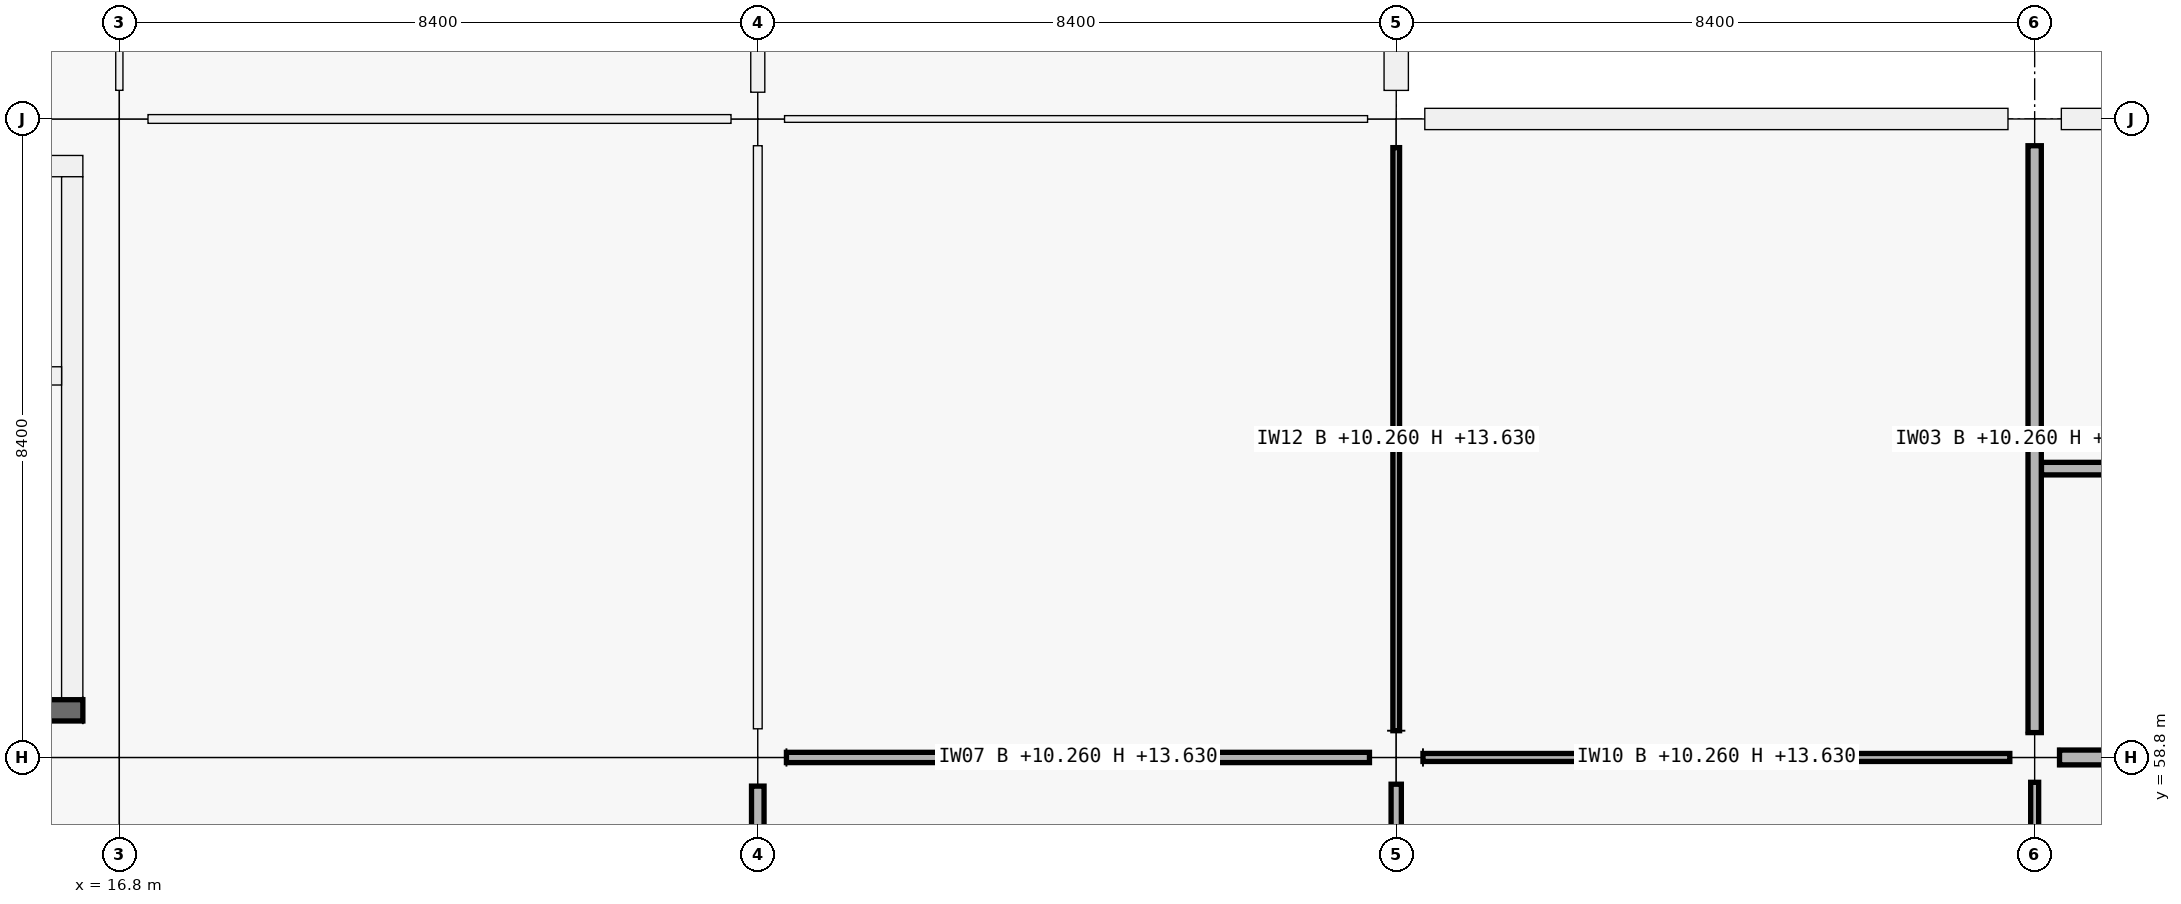
"""IFC4 building model, lengths in metres.
Left out: names, types, materials, properties, quantities, classifications, styles, units other than length and angle.
Written with IfcOpenShell. Run it as: python <this file> out.ifc"""

import sys

from ifc_helpers import new_model, si_unit, direction, frame, frame_2d, origin, origin_2d, place, context, subcontext, project, spatial, rectangle, extrude, element, fill, save


model = new_model("IFC4")
c1 = context("Model", 3, precision=1e-05, world=origin(), true_north=direction((0.0, 1.0)))
c2 = subcontext(c1, "Body", "Model", "MODEL_VIEW")
j1 = project(units=[si_unit("LENGTHUNIT", "METRE"), si_unit("PLANEANGLEUNIT", "RADIAN")], contexts=[c1])
p1 = place(None, origin())
s1 = spatial("IfcSite", under=j1, at=p1, CompositionType="ELEMENT")
p2 = place(p1, origin())
s2 = spatial("IfcBuilding", under=s1, at=p2, CompositionType="ELEMENT")
p3 = place(p2, frame((0.0, 0.0, 10.26)))
s3 = spatial("IfcBuildingStorey", under=s2, at=p3, CompositionType="ELEMENT", Elevation=10.26)
p4 = place(p3, frame((16.8, 58.8, 0.0), z_axis=(0.0, 0.0, 1.0), x_axis=(1.0, 0.0, 0.0)))
e1 = element("IfcColumn", 1, at=p4, inside=s3, PredefinedType="COLUMN", context=c2, shape_type="SweptSolid", body=[
    extrude(rectangle(XDim=0.7, YDim=0.7, at=origin_2d()), origin(), (0.0, 0.0, 1.0), 4.5),
])
for number, where, z_axis, x_axis in (
    (2, (16.8, 67.2, 0.0), (0.0, 0.0, 1.0), (1.0, 0.0, 0.0)),
    (3, (25.2, 58.8, 0.0), (0.0, 0.0, 1.0), (1.0, 0.0, 0.0)),
):
    element("IfcColumn", number, at=place(p3, frame(where, z_axis=z_axis, x_axis=x_axis)), inside=s3, PredefinedType="COLUMN", context=c2, shape_type="SweptSolid", body=[
        extrude(rectangle(XDim=0.75, YDim=0.75, at=origin_2d()), origin(), (0.0, 0.0, 1.0), 4.5),
    ])
for number, where, z_axis, x_axis in (
    (4, (25.2, 67.2, 0.0), (0.0, 0.0, 1.0), (1.0, 0.0, 0.0)),
    (5, (33.6, 58.8, 0.0), (0.0, 0.0, 1.0), (1.0, 0.0, 0.0)),
):
    element("IfcColumn", number, at=place(p3, frame(where, z_axis=z_axis, x_axis=x_axis)), inside=s3, PredefinedType="COLUMN", context=c2, shape_type="SweptSolid", body=[
        extrude(rectangle(XDim=0.7, YDim=0.7, at=origin_2d()), origin(), (0.0, 0.0, 1.0), 4.5),
    ])
p5 = place(p3, frame((33.6, 67.2, 0.0), z_axis=(0.0, 0.0, 1.0), x_axis=(1.0, 0.0, 0.0)))
e6 = element("IfcColumn", 6, at=p5, inside=s3, PredefinedType="COLUMN", context=c2, shape_type="SweptSolid", body=[
    extrude(rectangle(XDim=0.75, YDim=0.75, at=origin_2d()), origin(), (0.0, 0.0, 1.0), 4.5),
])
p6 = place(p3, frame((42.0, 58.8, 0.0), z_axis=(0.0, 0.0, 1.0), x_axis=(1.0, 0.0, 0.0)))
e7 = element("IfcColumn", 7, at=p6, inside=s3, PredefinedType="COLUMN", context=c2, shape_type="SweptSolid", body=[
    extrude(rectangle(XDim=0.65, YDim=0.65, at=origin_2d()), origin(), (0.0, 0.0, 1.0), 4.5),
])
p7 = place(p3, frame((42.0, 67.2, 0.0), z_axis=(0.0, 0.0, 1.0), x_axis=(1.0, 0.0, 0.0)))
e8 = element("IfcColumn", 8, at=p7, inside=s3, PredefinedType="COLUMN", context=c2, shape_type="SweptSolid", body=[
    extrude(rectangle(XDim=0.7, YDim=0.7, at=origin_2d()), origin(), (0.0, 0.0, 1.0), 4.5),
])
p8 = place(p3, frame((33.6, 75.249, 0.0), z_axis=(0.0, 0.0, 1.0), x_axis=(0.0, -1.0, 0.0)))
e9 = element("IfcWall", 9, at=p8, inside=s3, PredefinedType="SOLIDWALL", context=c2, shape_type="SweptSolid", body=[
    extrude(rectangle(XDim=7.673, YDim=0.32, at=frame_2d((3.836, 0.0))), origin(), (0.0, 0.0, 1.0), 3.54),
])
p9 = place(p8, frame((2.486, 0.0, 0.9)))
e10 = element("IfcOpeningElement", 10, at=p9, cuts=e9, PredefinedType="OPENING", context=c2, shape_type="SweptSolid", body=[
    extrude(rectangle(XDim=2.7, YDim=1.2, at=frame_2d((1.35, 0.6))), frame((0.0, 0.16, 0.0), z_axis=(0.0, -1.0, 0.0), x_axis=(1.0, 0.0, 0.0)), (0.0, 0.0, 1.0), 0.32),
])
p10 = place(p3, frame((33.976, 67.2, 0.0), z_axis=(0.0, 0.0, 1.0), x_axis=(1.0, 0.0, 0.0)))
e11 = element("IfcWall", 11, at=p10, inside=s3, PredefinedType="SOLIDWALL", context=c2, shape_type="SweptSolid", body=[
    extrude(rectangle(XDim=7.673, YDim=0.28, at=frame_2d((3.836, 0.0))), origin(), (0.0, 0.0, 1.0), 3.54),
])
p11 = place(p10, frame((2.937, 0.0, 0.9)))
e12 = element("IfcOpeningElement", 12, at=p11, cuts=e11, PredefinedType="OPENING", context=c2, shape_type="SweptSolid", body=[
    extrude(rectangle(XDim=1.8, YDim=1.35, at=frame_2d((0.9, 0.675))), frame((0.0, 0.14, 0.0), z_axis=(0.0, -1.0, 0.0), x_axis=(1.0, 0.0, 0.0)), (0.0, 0.0, 1.0), 0.28),
])
p12 = place(p3, frame((42.351, 67.2, 0.0), z_axis=(0.0, 0.0, 1.0), x_axis=(1.0, 0.0, 0.0)))
e13 = element("IfcWall", 13, at=p12, inside=s3, PredefinedType="SOLIDWALL", context=c2, shape_type="SweptSolid", body=[
    extrude(rectangle(XDim=7.673, YDim=0.28, at=frame_2d((3.836, 0.0))), origin(), (0.0, 0.0, 1.0), 3.54),
])
p13 = place(p12, frame((3.136, 0.0, 0.9)))
e14 = element("IfcOpeningElement", 14, at=p13, cuts=e13, PredefinedType="OPENING", context=c2, shape_type="SweptSolid", body=[
    extrude(rectangle(XDim=1.4, YDim=1.75, at=frame_2d((0.7, 0.875))), frame((0.0, 0.14, 0.0), z_axis=(0.0, -1.0, 0.0), x_axis=(1.0, 0.0, 0.0)), (0.0, 0.0, 1.0), 0.28),
])
p14 = place(p3, frame((16.32, 59.42, 0.0), z_axis=(0.0, 0.0, 1.0), x_axis=(-1.0, 0.0, 0.0)))
e15 = element("IfcWall", 15, at=p14, inside=s3, PredefinedType="SHEAR", context=c2, shape_type="SweptSolid", body=[
    extrude(rectangle(XDim=7.44, YDim=0.28, at=frame_2d((3.72, 0.0))), origin(), (0.0, 0.0, 1.0), 4.5),
])
p15 = place(p14, frame((1.28, 0.0, 0.0)))
e16 = element("IfcOpeningElement", 16, at=p15, cuts=e15, PredefinedType="OPENING", context=c2, shape_type="SweptSolid", body=[
    extrude(rectangle(XDim=1.5, YDim=2.15, at=frame_2d((0.75, 1.075))), frame((0.0, 0.14, 0.0), z_axis=(0.0, -1.0, 0.0), x_axis=(1.0, 0.0, 0.0)), (0.0, 0.0, 1.0), 0.28),
])
p16 = place(p3, frame((8.88, 66.58, 0.0), z_axis=(0.0, 0.0, 1.0), x_axis=(1.0, 0.0, 0.0)))
e17 = element("IfcWall", 17, at=p16, inside=s3, PredefinedType="SHEAR", context=c2, shape_type="SweptSolid", body=[
    extrude(rectangle(XDim=7.44, YDim=0.28, at=frame_2d((3.72, 0.0))), origin(), (0.0, 0.0, 1.0), 4.5),
])
p17 = place(p3, frame((16.18, 66.44, 0.0), z_axis=(0.0, 0.0, 1.0), x_axis=(0.0, -1.0, 0.0)))
e18 = element("IfcWall", 18, at=p17, inside=s3, PredefinedType="SHEAR", context=c2, shape_type="SweptSolid", body=[
    extrude(rectangle(XDim=6.88, YDim=0.28, at=frame_2d((3.44, 0.0))), origin(), (0.0, 0.0, 1.0), 4.5),
])
p18 = place(p3, frame((12.56, 63.82, 0.0), z_axis=(0.0, 0.0, 1.0), x_axis=(1.0, 0.0, 0.0)))
e19 = element("IfcWall", 19, at=p18, inside=s3, PredefinedType="SHEAR", context=c2, shape_type="SweptSolid", body=[
    extrude(rectangle(XDim=3.48, YDim=0.24, at=frame_2d((1.74, 0.0))), origin(), (0.0, 0.0, 1.0), 4.5),
])
p19 = place(p18, frame((1.19, 0.0, 0.0)))
e20 = element("IfcOpeningElement", 20, at=p19, cuts=e19, PredefinedType="OPENING", context=c2, shape_type="SweptSolid", body=[
    extrude(rectangle(XDim=1.1, YDim=2.15, at=frame_2d((0.55, 1.075))), frame((0.0, 0.12, 0.0), z_axis=(0.0, -1.0, 0.0), x_axis=(1.0, 0.0, 0.0)), (0.0, 0.0, 1.0), 0.24),
])
p20 = place(p3, frame((17.177, 67.2, 0.0), z_axis=(0.0, 0.0, 1.0), x_axis=(1.0, 0.0, 0.0)))
e21 = element("IfcWall", 21, at=p20, inside=s3, PredefinedType="PARTITIONING", context=c2, shape_type="SweptSolid", body=[
    extrude(rectangle(XDim=7.671, YDim=0.115, at=frame_2d((3.835, 0.0))), origin(), (0.0, 0.0, 1.0), 3.37),
])
p21 = place(p20, frame((3.316, 0.0, 0.0)))
e22 = element("IfcOpeningElement", 22, at=p21, cuts=e21, PredefinedType="OPENING", context=c2, shape_type="SweptSolid", body=[
    extrude(rectangle(XDim=1.04, YDim=2.2, at=frame_2d((0.52, 1.1))), frame((0.0, 0.058, 0.0), z_axis=(0.0, -1.0, 0.0), x_axis=(1.0, 0.0, 0.0)), (0.0, 0.0, 1.0), 0.115),
])
p22 = place(p3, frame((25.577, 58.8, 0.0), z_axis=(0.0, 0.0, 1.0), x_axis=(1.0, 0.0, 0.0)))
e23 = element("IfcWall", 23, at=p22, inside=s3, PredefinedType="PARTITIONING", context=c2, shape_type="SweptSolid", body=[
    extrude(rectangle(XDim=7.671, YDim=0.135, at=frame_2d((3.835, 0.0))), origin(), (0.0, 0.0, 1.0), 3.37),
])
p23 = place(p22, frame((3.306, 0.0, 0.0)))
e24 = element("IfcOpeningElement", 24, at=p23, cuts=e23, PredefinedType="OPENING", context=c2, shape_type="SweptSolid", body=[
    extrude(rectangle(XDim=1.06, YDim=2.25, at=frame_2d((0.53, 1.125))), frame((0.0, 0.067, 0.0), z_axis=(0.0, -1.0, 0.0), x_axis=(1.0, 0.0, 0.0)), (0.0, 0.0, 1.0), 0.135),
])
p24 = place(p3, frame((25.552, 67.2, 0.0), z_axis=(0.0, 0.0, 1.0), x_axis=(1.0, 0.0, 0.0)))
e25 = element("IfcWall", 25, at=p24, inside=s3, PredefinedType="PARTITIONING", context=c2, shape_type="SweptSolid", body=[
    extrude(rectangle(XDim=7.671, YDim=0.088, at=frame_2d((3.835, 0.0))), origin(), (0.0, 0.0, 1.0), 3.37),
])
p25 = place(p24, frame((3.316, 0.0, 0.0)))
e26 = element("IfcOpeningElement", 26, at=p25, cuts=e25, PredefinedType="OPENING", context=c2, shape_type="SweptSolid", body=[
    extrude(rectangle(XDim=1.04, YDim=2.2, at=frame_2d((0.52, 1.1))), frame((0.0, 0.044, 0.0), z_axis=(0.0, -1.0, 0.0), x_axis=(1.0, 0.0, 0.0)), (0.0, 0.0, 1.0), 0.088),
])
p26 = place(p3, frame((33.952, 58.8, 0.0), z_axis=(0.0, 0.0, 1.0), x_axis=(1.0, 0.0, 0.0)))
e27 = element("IfcWall", 27, at=p26, inside=s3, PredefinedType="PARTITIONING", context=c2, shape_type="SweptSolid", body=[
    extrude(rectangle(XDim=7.721, YDim=0.105, at=frame_2d((3.861, 0.0))), origin(), (0.0, 0.0, 1.0), 3.37),
])
p27 = place(p26, frame((3.351, 0.0, 0.0)))
e28 = element("IfcOpeningElement", 28, at=p27, cuts=e27, PredefinedType="OPENING", context=c2, shape_type="SweptSolid", body=[
    extrude(rectangle(XDim=1.02, YDim=2.2, at=frame_2d((0.51, 1.1))), frame((0.0, 0.052, 0.0), z_axis=(0.0, -1.0, 0.0), x_axis=(1.0, 0.0, 0.0)), (0.0, 0.0, 1.0), 0.105),
])
p28 = place(p3, frame((42.327, 58.8, 0.0), z_axis=(0.0, 0.0, 1.0), x_axis=(1.0, 0.0, 0.0)))
e29 = element("IfcWall", 29, at=p28, inside=s3, PredefinedType="PARTITIONING", context=c2, shape_type="SweptSolid", body=[
    extrude(rectangle(XDim=7.771, YDim=0.195, at=frame_2d((3.885, 0.0))), origin(), (0.0, 0.0, 1.0), 3.37),
])
p29 = place(p3, frame((16.8, 67.577, 0.0), z_axis=(0.0, 0.0, 1.0), x_axis=(0.0, 1.0, 0.0)))
e30 = element("IfcWall", 30, at=p29, inside=s3, PredefinedType="PARTITIONING", context=c2, shape_type="SweptSolid", body=[
    extrude(rectangle(XDim=7.671, YDim=0.095, at=frame_2d((3.835, 0.0))), origin(), (0.0, 0.0, 1.0), 3.37),
])
p30 = place(p29, frame((3.311, 0.0, 0.0)))
e31 = element("IfcOpeningElement", 31, at=p30, cuts=e30, PredefinedType="OPENING", context=c2, shape_type="SweptSolid", body=[
    extrude(rectangle(XDim=1.05, YDim=2.12, at=frame_2d((0.525, 1.06))), frame((0.0, 0.047, 0.0), z_axis=(0.0, -1.0, 0.0), x_axis=(1.0, 0.0, 0.0)), (0.0, 0.0, 1.0), 0.095),
])
p31 = place(p3, frame((25.2, 50.752, 0.0), z_axis=(0.0, 0.0, 1.0), x_axis=(0.0, 1.0, 0.0)))
e32 = element("IfcWall", 32, at=p31, inside=s3, PredefinedType="PARTITIONING", context=c2, shape_type="SweptSolid", body=[
    extrude(rectangle(XDim=7.671, YDim=0.165, at=frame_2d((3.835, 0.0))), origin(), (0.0, 0.0, 1.0), 3.37),
])
p32 = place(p31, frame((3.306, 0.0, 0.0)))
e33 = element("IfcOpeningElement", 33, at=p32, cuts=e32, PredefinedType="OPENING", context=c2, shape_type="SweptSolid", body=[
    extrude(rectangle(XDim=1.06, YDim=2.25, at=frame_2d((0.53, 1.125))), frame((0.0, 0.083, 0.0), z_axis=(0.0, -1.0, 0.0), x_axis=(1.0, 0.0, 0.0)), (0.0, 0.0, 1.0), 0.165),
])
p33 = place(p3, frame((25.2, 59.177, 0.0), z_axis=(0.0, 0.0, 1.0), x_axis=(0.0, 1.0, 0.0)))
e34 = element("IfcWall", 34, at=p33, inside=s3, PredefinedType="PARTITIONING", context=c2, shape_type="SweptSolid", body=[
    extrude(rectangle(XDim=7.671, YDim=0.115, at=frame_2d((3.835, 0.0))), origin(), (0.0, 0.0, 1.0), 3.37),
])
p34 = place(p33, frame((3.316, 0.0, 0.0)))
e35 = element("IfcOpeningElement", 35, at=p34, cuts=e34, PredefinedType="OPENING", context=c2, shape_type="SweptSolid", body=[
    extrude(rectangle(XDim=1.04, YDim=2.2, at=frame_2d((0.52, 1.1))), frame((0.0, 0.058, 0.0), z_axis=(0.0, -1.0, 0.0), x_axis=(1.0, 0.0, 0.0)), (0.0, 0.0, 1.0), 0.115),
])
p35 = place(p3, frame((25.2, 67.552, 0.0), z_axis=(0.0, 0.0, 1.0), x_axis=(0.0, 1.0, 0.0)))
e36 = element("IfcWall", 36, at=p35, inside=s3, PredefinedType="PARTITIONING", context=c2, shape_type="SweptSolid", body=[
    extrude(rectangle(XDim=7.671, YDim=0.185, at=frame_2d((3.835, 0.0))), origin(), (0.0, 0.0, 1.0), 3.37),
])
p36 = place(p35, frame((3.356, 0.0, 0.0)))
e37 = element("IfcOpeningElement", 37, at=p36, cuts=e36, PredefinedType="OPENING", context=c2, shape_type="SweptSolid", body=[
    extrude(rectangle(XDim=0.96, YDim=2.18, at=frame_2d((0.48, 1.09))), frame((0.0, 0.093, 0.0), z_axis=(0.0, -1.0, 0.0), x_axis=(1.0, 0.0, 0.0)), (0.0, 0.0, 1.0), 0.185),
])
p37 = place(p3, frame((33.6, 50.777, 0.0), z_axis=(0.0, 0.0, 1.0), x_axis=(0.0, 1.0, 0.0)))
e38 = element("IfcWall", 38, at=p37, inside=s3, PredefinedType="PARTITIONING", context=c2, shape_type="SweptSolid", body=[
    extrude(rectangle(XDim=7.671, YDim=0.135, at=frame_2d((3.835, 0.0))), origin(), (0.0, 0.0, 1.0), 3.37),
])
p38 = place(p37, frame((3.336, 0.0, 0.0)))
e39 = element("IfcOpeningElement", 39, at=p38, cuts=e38, PredefinedType="OPENING", context=c2, shape_type="SweptSolid", body=[
    extrude(rectangle(XDim=1.0, YDim=2.2, at=frame_2d((0.5, 1.1))), frame((0.0, 0.067, 0.0), z_axis=(0.0, -1.0, 0.0), x_axis=(1.0, 0.0, 0.0)), (0.0, 0.0, 1.0), 0.135),
])
p39 = place(p3, frame((33.6, 59.152, 0.0), z_axis=(0.0, 0.0, 1.0), x_axis=(0.0, 1.0, 0.0)))
e40 = element("IfcWall", 40, at=p39, inside=s3, PredefinedType="PARTITIONING", context=c2, shape_type="SweptSolid", body=[
    extrude(rectangle(XDim=7.671, YDim=0.088, at=frame_2d((3.835, 0.0))), origin(), (0.0, 0.0, 1.0), 3.37),
])
p40 = place(p39, frame((3.365, 0.0, 0.0)))
e41 = element("IfcOpeningElement", 41, at=p40, cuts=e40, PredefinedType="OPENING", context=c2, shape_type="SweptSolid", body=[
    extrude(rectangle(XDim=0.94, YDim=2.15, at=frame_2d((0.47, 1.075))), frame((0.0, 0.044, 0.0), z_axis=(0.0, -1.0, 0.0), x_axis=(1.0, 0.0, 0.0)), (0.0, 0.0, 1.0), 0.088),
])
p41 = place(p3, frame((42.0, 50.702, 0.0), z_axis=(0.0, 0.0, 1.0), x_axis=(0.0, 1.0, 0.0)))
e42 = element("IfcWall", 42, at=p41, inside=s3, PredefinedType="PARTITIONING", context=c2, shape_type="SweptSolid", body=[
    extrude(rectangle(XDim=7.771, YDim=0.105, at=frame_2d((3.885, 0.0))), origin(), (0.0, 0.0, 1.0), 3.37),
])
p42 = place(p3, frame((42.0, 59.127, 0.0), z_axis=(0.0, 0.0, 1.0), x_axis=(0.0, 1.0, 0.0)))
e43 = element("IfcWall", 43, at=p42, inside=s3, PredefinedType="PARTITIONING", context=c2, shape_type="SweptSolid", body=[
    extrude(rectangle(XDim=7.721, YDim=0.175, at=frame_2d((3.86, 0.0))), origin(), (0.0, 0.0, 1.0), 3.37),
])
p43 = place(p3, frame((42.09, 62.6, 0.0), z_axis=(0.0, 0.0, 1.0), x_axis=(1.0, 0.0, 0.0)))
e44 = element("IfcWall", 44, at=p43, inside=s3, PredefinedType="PARTITIONING", context=c2, shape_type="SweptSolid", body=[
    extrude(rectangle(XDim=8.236, YDim=0.165, at=frame_2d((4.118, 0.0))), origin(), (0.0, 0.0, 1.0), 3.37),
])
p44 = place(p11, origin())
e45 = element("IfcWindow", 45, at=p44, inside=s3, PartitioningType="SINGLE_PANEL", PredefinedType="WINDOW", context=c2, shape_type="SweptSolid", body=[
    extrude(rectangle(XDim=1.8, YDim=1.35, at=frame_2d((0.9, 0.675))), frame((0.0, 0.03, 0.0), z_axis=(0.0, -1.0, 0.0), x_axis=(1.0, 0.0, 0.0)), (0.0, 0.0, 1.0), 0.06),
])
fill(e12, e45)
p45 = place(p21, origin())
e46 = element("IfcDoor", 46, at=p45, inside=s3, OperationType="SINGLE_SWING_LEFT", PredefinedType="DOOR", context=c2, shape_type="SweptSolid", body=[
    extrude(rectangle(XDim=1.04, YDim=2.2, at=frame_2d((0.52, 1.1))), frame((0.0, 0.025, 0.0), z_axis=(0.0, -1.0, 0.0), x_axis=(1.0, 0.0, 0.0)), (0.0, 0.0, 1.0), 0.05),
])
fill(e22, e46)
p46 = place(p34, origin())
e47 = element("IfcDoor", 47, at=p46, inside=s3, OperationType="SINGLE_SWING_RIGHT", PredefinedType="DOOR", context=c2, shape_type="SweptSolid", body=[
    extrude(rectangle(XDim=1.04, YDim=2.2, at=frame_2d((0.52, 1.1))), frame((0.0, 0.025, 0.0), z_axis=(0.0, -1.0, 0.0), x_axis=(1.0, 0.0, 0.0)), (0.0, 0.0, 1.0), 0.05),
])
fill(e35, e47)
p47 = place(p25, origin())
e48 = element("IfcDoor", 48, at=p47, inside=s3, OperationType="SINGLE_SWING_RIGHT", PredefinedType="DOOR", context=c2, shape_type="SweptSolid", body=[
    extrude(rectangle(XDim=1.04, YDim=2.2, at=frame_2d((0.52, 1.1))), frame((0.0, 0.025, 0.0), z_axis=(0.0, -1.0, 0.0), x_axis=(1.0, 0.0, 0.0)), (0.0, 0.0, 1.0), 0.05),
])
fill(e26, e48)
p48 = place(p27, origin())
e49 = element("IfcDoor", 49, at=p48, inside=s3, OperationType="SINGLE_SWING_LEFT", PredefinedType="DOOR", context=c2, shape_type="SweptSolid", body=[
    extrude(rectangle(XDim=1.02, YDim=2.2, at=frame_2d((0.51, 1.1))), frame((0.0, 0.025, 0.0), z_axis=(0.0, -1.0, 0.0), x_axis=(1.0, 0.0, 0.0)), (0.0, 0.0, 1.0), 0.05),
])
fill(e28, e49)
p49 = place(p23, origin())
e50 = element("IfcDoor", 50, at=p49, inside=s3, OperationType="SINGLE_SWING_LEFT", PredefinedType="DOOR", context=c2, shape_type="SweptSolid", body=[
    extrude(rectangle(XDim=1.06, YDim=2.25, at=frame_2d((0.53, 1.125))), frame((0.0, 0.025, 0.0), z_axis=(0.0, -1.0, 0.0), x_axis=(1.0, 0.0, 0.0)), (0.0, 0.0, 1.0), 0.05),
])
fill(e24, e50)
p50 = place(p40, origin())
e51 = element("IfcDoor", 51, at=p50, inside=s3, OperationType="SINGLE_SWING_LEFT", PredefinedType="DOOR", context=c2, shape_type="SweptSolid", body=[
    extrude(rectangle(XDim=0.94, YDim=2.15, at=frame_2d((0.47, 1.075))), frame((0.0, 0.025, 0.0), z_axis=(0.0, -1.0, 0.0), x_axis=(1.0, 0.0, 0.0)), (0.0, 0.0, 1.0), 0.05),
])
fill(e41, e51)
save(model, sys.argv[1])
